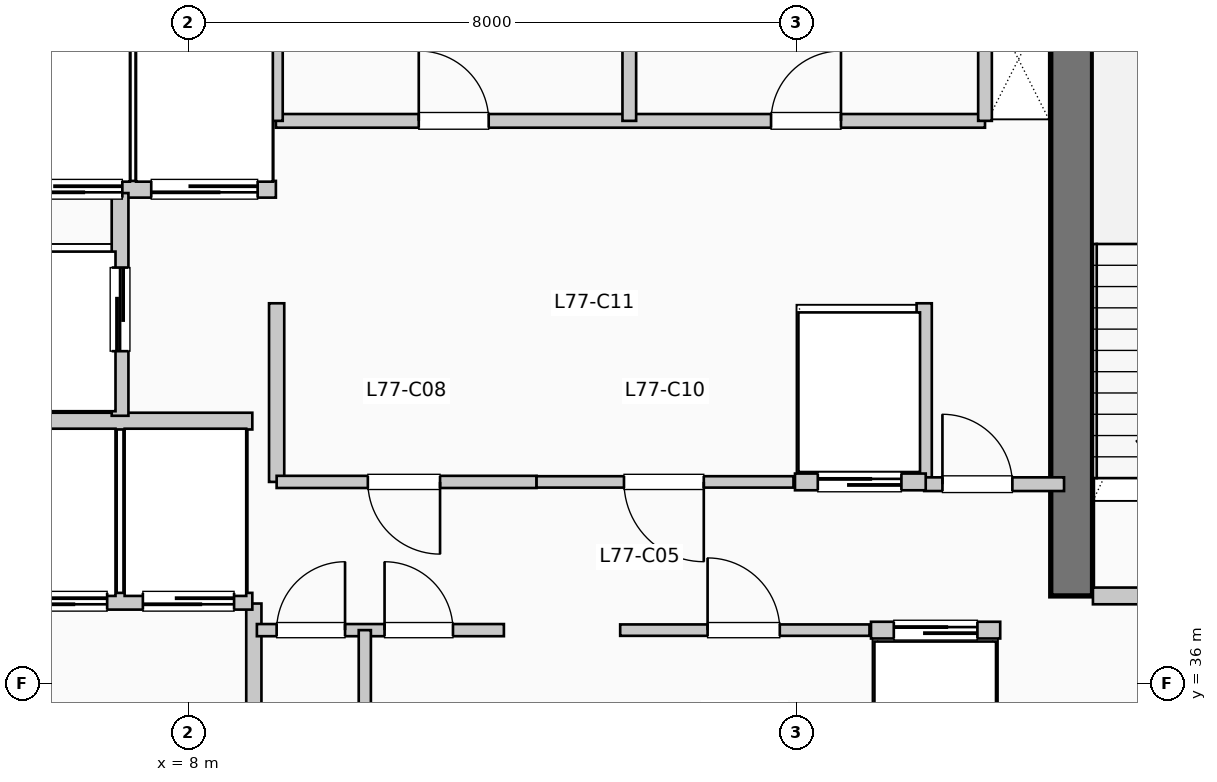
"""IFC4 building model, lengths in metres.
Left out: names, types, materials, properties, quantities, classifications, styles, units other than length and angle.
Written with IfcOpenShell. Run it as: python <this file> out.ifc"""

import sys

from ifc_helpers import new_model, si_unit, direction, frame, frame_2d, origin, place, context, subcontext, project, spatial, rectangle, extrude, element, fill, save


model = new_model("IFC4")
c1 = context("Model", 3, precision=1e-05, world=origin(), true_north=direction((0.0, 1.0)))
c2 = subcontext(c1, "Body", "Model", "MODEL_VIEW")
j1 = project(units=[si_unit("LENGTHUNIT", "METRE"), si_unit("PLANEANGLEUNIT", "RADIAN")], contexts=[c1])
p1 = place(None, origin())
s1 = spatial("IfcSite", under=j1, at=p1, CompositionType="ELEMENT")
p2 = place(p1, origin())
s2 = spatial("IfcBuilding", under=s1, at=p2, CompositionType="ELEMENT")
p3 = place(p2, frame((0.0, 0.0, 315.81)))
s3 = spatial("IfcBuildingStorey", under=s2, at=p3, CompositionType="ELEMENT", Elevation=315.81)
p4 = place(p3, frame((19.62, 37.15, 0.0), z_axis=(0.0, 0.0, 1.0), x_axis=(0.0, 1.0, 0.0)))
e1 = element("IfcWall", 1, at=p4, inside=s3, PredefinedType="SHEAR", context=c2, shape_type="SweptSolid", body=[
    extrude(rectangle(XDim=7.89, YDim=0.55, at=frame_2d((3.945, 0.0))), origin(), (0.0, 0.0, 1.0), 3.96),
])
p5 = place(p3, frame((8.86, 34.55, 0.0), z_axis=(0.0, 0.0, 1.0), x_axis=(0.0, 1.0, 0.0)))
e2 = element("IfcWall", 2, at=p5, inside=s3, PredefinedType="PARTITIONING", context=c2, shape_type="SweptSolid", body=[
    extrude(rectangle(XDim=2.5, YDim=0.2, at=frame_2d((1.25, 0.0))), origin(), (0.0, 0.0, 1.0), 3.74),
])
p6 = place(p3, frame((19.9, 37.15, 0.0), z_axis=(0.0, 0.0, 1.0), x_axis=(1.0, 0.0, 0.0)))
e3 = element("IfcWall", 3, at=p6, inside=s3, PredefinedType="PARTITIONING", context=c2, shape_type="SweptSolid", body=[
    extrude(rectangle(XDim=3.15, YDim=0.22, at=frame_2d((1.575, 0.0))), origin(), (0.0, 0.0, 1.0), 3.74),
])
p7 = place(p6, frame((2.05, 0.0, 0.0), z_axis=(0.0, 0.0, 1.0), x_axis=(-1.0, 0.0, 0.0)))
e4 = element("IfcOpeningElement", 4, at=p7, cuts=e3, PredefinedType="OPENING", context=c2, shape_type="SweptSolid", body=[
    extrude(rectangle(XDim=1.05, YDim=2.15, at=frame_2d((0.525, 1.075))), frame((0.0, 0.12, 0.0), z_axis=(0.0, -1.0, 0.0), x_axis=(1.0, 0.0, 0.0)), (0.0, 0.0, 1.0), 0.24),
])
p8 = place(p3, frame((5.38, 37.08, 0.0), z_axis=(0.0, 0.0, 1.0), x_axis=(1.0, 0.0, 0.0)))
e5 = element("IfcWall", 5, at=p8, inside=s3, PredefinedType="PARTITIONING", context=c2, shape_type="SweptSolid", body=[
    extrude(rectangle(XDim=3.46, YDim=0.22, at=frame_2d((1.73, 0.0))), origin(), (0.0, 0.0, 1.0), 3.74),
])
p9 = place(p8, frame((1.55, 0.0, 0.0), z_axis=(0.0, 0.0, 1.0), x_axis=(-1.0, 0.0, 0.0)))
e6 = element("IfcOpeningElement", 6, at=p9, cuts=e5, PredefinedType="OPENING", context=c2, shape_type="SweptSolid", body=[
    extrude(rectangle(XDim=1.2, YDim=2.2, at=frame_2d((0.6, 1.1))), frame((0.0, 0.12, 0.0), z_axis=(0.0, -1.0, 0.0), x_axis=(1.0, 0.0, 0.0)), (0.0, 0.0, 1.0), 0.24),
])
p10 = place(p8, frame((3.22, 0.0, 0.0), z_axis=(0.0, 0.0, 1.0), x_axis=(-1.0, 0.0, 0.0)))
e7 = element("IfcOpeningElement", 7, at=p10, cuts=e5, PredefinedType="OPENING", context=c2, shape_type="SweptSolid", body=[
    extrude(rectangle(XDim=1.2, YDim=2.2, at=frame_2d((0.6, 1.1))), frame((0.0, 0.12, 0.0), z_axis=(0.0, -1.0, 0.0), x_axis=(1.0, 0.0, 0.0)), (0.0, 0.0, 1.0), 0.24),
])
p11 = place(p3, frame((5.38, 39.45, 0.0), z_axis=(0.0, 0.0, 1.0), x_axis=(1.0, 0.0, 0.0)))
e8 = element("IfcWall", 8, at=p11, inside=s3, PredefinedType="PARTITIONING", context=c2, shape_type="SweptSolid", body=[
    extrude(rectangle(XDim=3.46, YDim=0.22, at=frame_2d((1.73, 0.0))), origin(), (0.0, 0.0, 1.0), 3.74),
])
p12 = place(p3, frame((5.38, 42.5, 0.0), z_axis=(0.0, 0.0, 1.0), x_axis=(1.0, 0.0, 0.0)))
e9 = element("IfcWall", 9, at=p12, inside=s3, PredefinedType="PARTITIONING", context=c2, shape_type="SweptSolid", body=[
    extrude(rectangle(XDim=3.77, YDim=0.22, at=frame_2d((1.885, 0.0))), origin(), (0.0, 0.0, 1.0), 3.74),
])
p13 = place(p12, frame((1.75, 0.0, 0.0), z_axis=(0.0, 0.0, 1.0), x_axis=(-1.0, 0.0, 0.0)))
e10 = element("IfcOpeningElement", 10, at=p13, cuts=e9, PredefinedType="OPENING", context=c2, shape_type="SweptSolid", body=[
    extrude(rectangle(XDim=1.4, YDim=2.2, at=frame_2d((0.7, 1.1))), frame((0.0, 0.12, 0.0), z_axis=(0.0, -1.0, 0.0), x_axis=(1.0, 0.0, 0.0)), (0.0, 0.0, 1.0), 0.24),
])
p14 = place(p12, frame((3.53, 0.0, 0.0), z_axis=(0.0, 0.0, 1.0), x_axis=(-1.0, 0.0, 0.0)))
e11 = element("IfcOpeningElement", 11, at=p14, cuts=e9, PredefinedType="OPENING", context=c2, shape_type="SweptSolid", body=[
    extrude(rectangle(XDim=1.4, YDim=2.2, at=frame_2d((0.7, 1.1))), frame((0.0, 0.12, 0.0), z_axis=(0.0, -1.0, 0.0), x_axis=(1.0, 0.0, 0.0)), (0.0, 0.0, 1.0), 0.24),
])
p15 = place(p3, frame((7.1, 39.52, 0.0), z_axis=(0.0, 0.0, 1.0), x_axis=(0.0, 1.0, 0.0)))
e12 = element("IfcWall", 12, at=p15, inside=s3, PredefinedType="PARTITIONING", context=c2, shape_type="SweptSolid", body=[
    extrude(rectangle(XDim=2.93, YDim=0.22, at=frame_2d((1.465, 0.0))), origin(), (0.0, 0.0, 1.0), 3.74),
])
p16 = place(p15, frame((0.85, 0.0, 0.0)))
e13 = element("IfcOpeningElement", 13, at=p16, cuts=e12, PredefinedType="OPENING", context=c2, shape_type="SweptSolid", body=[
    extrude(rectangle(XDim=1.1, YDim=2.2, at=frame_2d((0.55, 1.1))), frame((0.0, 0.12, 0.0), z_axis=(0.0, -1.0, 0.0), x_axis=(1.0, 0.0, 0.0)), (0.0, 0.0, 1.0), 0.24),
])
for number, where, z_axis, x_axis in (
    (14, (9.16, 38.65, 0.0), (0.0, 0.0, 1.0), (0.0, 1.0, 0.0)),
    (15, (17.68, 38.65, 0.0), (0.0, 0.0, 1.0), (0.0, 1.0, 0.0)),
):
    element("IfcWall", number, at=place(p3, frame(where, z_axis=z_axis, x_axis=x_axis)), inside=s3, PredefinedType="PARTITIONING", context=c2, shape_type="SweptSolid", body=[
        extrude(rectangle(XDim=2.35, YDim=0.2, at=frame_2d((1.175, 0.0))), origin(), (0.0, 0.0, 1.0), 3.74),
    ])
p17 = place(p3, frame((17.68, 38.62, 0.0), z_axis=(0.0, 0.0, 1.0), x_axis=(1.0, 0.0, 0.0)))
e16 = element("IfcWall", 16, at=p17, inside=s3, PredefinedType="PARTITIONING", context=c2, shape_type="SweptSolid", body=[
    extrude(rectangle(XDim=1.84, YDim=0.18, at=frame_2d((0.92, 0.0))), origin(), (0.0, 0.0, 1.0), 3.74),
])
p18 = place(p17, frame((0.24, 0.0, 0.0)))
e17 = element("IfcOpeningElement", 17, at=p18, cuts=e16, PredefinedType="OPENING", context=c2, shape_type="SweptSolid", body=[
    extrude(rectangle(XDim=0.92, YDim=2.1, at=frame_2d((0.46, 1.05))), frame((0.0, 0.1, 0.0), z_axis=(0.0, -1.0, 0.0), x_axis=(1.0, 0.0, 0.0)), (0.0, 0.0, 1.0), 0.2),
])
p19 = place(p3, frame((8.9, 36.7, 0.0), z_axis=(0.0, 0.0, 1.0), x_axis=(1.0, 0.0, 0.0)))
e18 = element("IfcWall", 18, at=p19, inside=s3, PredefinedType="PARTITIONING", context=c2, shape_type="SweptSolid", body=[
    extrude(rectangle(XDim=3.25, YDim=0.16, at=frame_2d((1.625, 0.0))), origin(), (0.0, 0.0, 1.0), 3.74),
])
p20 = place(p19, frame((0.26, 0.0, 0.0)))
e19 = element("IfcOpeningElement", 19, at=p20, cuts=e18, PredefinedType="OPENING", context=c2, shape_type="SweptSolid", body=[
    extrude(rectangle(XDim=0.9, YDim=2.15, at=frame_2d((0.45, 1.075))), frame((0.0, 0.09, 0.0), z_axis=(0.0, -1.0, 0.0), x_axis=(1.0, 0.0, 0.0)), (0.0, 0.0, 1.0), 0.18),
])
p21 = place(p19, frame((1.68, 0.0, 0.0)))
e20 = element("IfcOpeningElement", 20, at=p21, cuts=e18, PredefinedType="OPENING", context=c2, shape_type="SweptSolid", body=[
    extrude(rectangle(XDim=0.9, YDim=2.15, at=frame_2d((0.45, 1.075))), frame((0.0, 0.09, 0.0), z_axis=(0.0, -1.0, 0.0), x_axis=(1.0, 0.0, 0.0)), (0.0, 0.0, 1.0), 0.18),
])
p22 = place(p3, frame((10.32, 34.55, 0.0), z_axis=(0.0, 0.0, 1.0), x_axis=(0.0, 1.0, 0.0)))
e21 = element("IfcWall", 21, at=p22, inside=s3, PredefinedType="PARTITIONING", context=c2, shape_type="SweptSolid", body=[
    extrude(rectangle(XDim=2.15, YDim=0.16, at=frame_2d((1.075, 0.0))), origin(), (0.0, 0.0, 1.0), 3.74),
])
p23 = place(p3, frame((9.16, 38.65, 0.0), z_axis=(0.0, 0.0, 1.0), x_axis=(1.0, 0.0, 0.0)))
e22 = element("IfcWall", 22, at=p23, inside=s3, PredefinedType="PARTITIONING", context=c2, shape_type="SweptSolid", body=[
    extrude(rectangle(XDim=3.42, YDim=0.16, at=frame_2d((1.71, 0.0))), origin(), (0.0, 0.0, 1.0), 3.74),
])
p24 = place(p23, frame((2.15, 0.0, 0.0), z_axis=(0.0, 0.0, 1.0), x_axis=(-1.0, 0.0, 0.0)))
e23 = element("IfcOpeningElement", 23, at=p24, cuts=e22, PredefinedType="OPENING", context=c2, shape_type="SweptSolid", body=[
    extrude(rectangle(XDim=0.95, YDim=2.15, at=frame_2d((0.475, 1.075))), frame((0.0, 0.09, 0.0), z_axis=(0.0, -1.0, 0.0), x_axis=(1.0, 0.0, 0.0)), (0.0, 0.0, 1.0), 0.18),
])
p25 = place(p3, frame((13.68, 36.7, 0.0), z_axis=(0.0, 0.0, 1.0), x_axis=(1.0, 0.0, 0.0)))
e24 = element("IfcWall", 24, at=p25, inside=s3, PredefinedType="PARTITIONING", context=c2, shape_type="SweptSolid", body=[
    extrude(rectangle(XDim=3.28, YDim=0.15, at=frame_2d((1.64, 0.0))), origin(), (0.0, 0.0, 1.0), 3.74),
])
p26 = place(p25, frame((1.15, 0.0, 0.0)))
e25 = element("IfcOpeningElement", 25, at=p26, cuts=e24, PredefinedType="OPENING", context=c2, shape_type="SweptSolid", body=[
    extrude(rectangle(XDim=0.95, YDim=2.15, at=frame_2d((0.475, 1.075))), frame((0.0, 0.085, 0.0), z_axis=(0.0, -1.0, 0.0), x_axis=(1.0, 0.0, 0.0)), (0.0, 0.0, 1.0), 0.17),
])
p27 = place(p3, frame((12.58, 38.65, 0.0), z_axis=(0.0, 0.0, 1.0), x_axis=(1.0, 0.0, 0.0)))
e26 = element("IfcWall", 26, at=p27, inside=s3, PredefinedType="PARTITIONING", context=c2, shape_type="SweptSolid", body=[
    extrude(rectangle(XDim=3.38, YDim=0.15, at=frame_2d((1.69, 0.0))), origin(), (0.0, 0.0, 1.0), 3.74),
])
p28 = place(p27, frame((2.2, 0.0, 0.0), z_axis=(0.0, 0.0, 1.0), x_axis=(-1.0, 0.0, 0.0)))
e27 = element("IfcOpeningElement", 27, at=p28, cuts=e26, PredefinedType="OPENING", context=c2, shape_type="SweptSolid", body=[
    extrude(rectangle(XDim=1.05, YDim=2.15, at=frame_2d((0.525, 1.075))), frame((0.0, 0.085, 0.0), z_axis=(0.0, -1.0, 0.0), x_axis=(1.0, 0.0, 0.0)), (0.0, 0.0, 1.0), 0.17),
])
p29 = place(p3, frame((16.98, 36.7, 0.0), z_axis=(0.0, 0.0, 1.0), x_axis=(1.0, 0.0, 0.0)))
e28 = element("IfcWall", 28, at=p29, inside=s3, PredefinedType="PARTITIONING", context=c2, shape_type="SweptSolid", body=[
    extrude(rectangle(XDim=1.7, YDim=0.22, at=frame_2d((0.85, 0.0))), origin(), (0.0, 0.0, 1.0), 3.74),
])
p30 = place(p29, frame((0.3, 0.0, 0.0)))
e29 = element("IfcOpeningElement", 29, at=p30, cuts=e28, PredefinedType="OPENING", context=c2, shape_type="SweptSolid", body=[
    extrude(rectangle(XDim=1.1, YDim=2.2, at=frame_2d((0.55, 1.1))), frame((0.0, 0.12, 0.0), z_axis=(0.0, -1.0, 0.0), x_axis=(1.0, 0.0, 0.0)), (0.0, 0.0, 1.0), 0.24),
])
p31 = place(p3, frame((15.98, 38.65, 0.0), z_axis=(0.0, 0.0, 1.0), x_axis=(1.0, 0.0, 0.0)))
e30 = element("IfcWall", 30, at=p31, inside=s3, PredefinedType="PARTITIONING", context=c2, shape_type="SweptSolid", body=[
    extrude(rectangle(XDim=1.72, YDim=0.22, at=frame_2d((0.86, 0.0))), origin(), (0.0, 0.0, 1.0), 3.74),
])
p32 = place(p31, frame((0.3, 0.0, 0.0)))
e31 = element("IfcOpeningElement", 31, at=p32, cuts=e30, PredefinedType="OPENING", context=c2, shape_type="SweptSolid", body=[
    extrude(rectangle(XDim=1.1, YDim=2.2, at=frame_2d((0.55, 1.1))), frame((0.0, 0.12, 0.0), z_axis=(0.0, -1.0, 0.0), x_axis=(1.0, 0.0, 0.0)), (0.0, 0.0, 1.0), 0.24),
])
p33 = place(p3, frame((9.15, 43.4, 0.0), z_axis=(0.0, 0.0, 1.0), x_axis=(1.0, 0.0, 0.0)))
e32 = element("IfcWall", 32, at=p33, inside=s3, PredefinedType="PLUMBINGWALL", context=c2, shape_type="SweptSolid", body=[
    extrude(rectangle(XDim=9.33, YDim=0.18, at=frame_2d((4.665, 0.0))), origin(), (0.0, 0.0, 1.0), 3.74),
])
p34 = place(p33, frame((1.88, 0.0, 0.0)))
e33 = element("IfcOpeningElement", 33, at=p34, cuts=e32, PredefinedType="OPENING", context=c2, shape_type="SweptSolid", body=[
    extrude(rectangle(XDim=0.92, YDim=2.1, at=frame_2d((0.46, 1.05))), frame((0.0, 0.1, 0.0), z_axis=(0.0, -1.0, 0.0), x_axis=(1.0, 0.0, 0.0)), (0.0, 0.0, 1.0), 0.2),
])
p35 = place(p33, frame((6.515, 0.0, 0.0)))
e34 = element("IfcOpeningElement", 34, at=p35, cuts=e32, PredefinedType="OPENING", context=c2, shape_type="SweptSolid", body=[
    extrude(rectangle(XDim=0.92, YDim=2.1, at=frame_2d((0.46, 1.05))), frame((0.0, 0.1, 0.0), z_axis=(0.0, -1.0, 0.0), x_axis=(1.0, 0.0, 0.0)), (0.0, 0.0, 1.0), 0.2),
])
for number, where, z_axis, x_axis in (
    (35, (9.15, 43.4, 0.0), (0.0, 0.0, 1.0), (0.0, 1.0, 0.0)),
    (36, (18.48, 43.4, 0.0), (0.0, 0.0, 1.0), (0.0, 1.0, 0.0)),
    (37, (13.8, 43.4, 0.0), (0.0, 0.0, 1.0), (0.0, 1.0, 0.0)),
):
    element("IfcWall", number, at=place(p3, frame(where, z_axis=z_axis, x_axis=x_axis)), inside=s3, PredefinedType="PLUMBINGWALL", context=c2, shape_type="SweptSolid", body=[
        extrude(rectangle(XDim=1.88, YDim=0.18, at=frame_2d((0.94, 0.0))), origin(), (0.0, 0.0, 1.0), 3.74),
    ])
p36 = place(p9, origin())
e38 = element("IfcDoor", 38, at=p36, inside=s3, OperationType="SLIDING_TO_RIGHT", PredefinedType="DOOR", context=c2, shape_type="SweptSolid", body=[
    extrude(rectangle(XDim=1.2, YDim=2.2, at=frame_2d((0.6, 1.1))), frame((0.0, 0.025, 0.0), z_axis=(0.0, -1.0, 0.0), x_axis=(1.0, 0.0, 0.0)), (0.0, 0.0, 1.0), 0.05),
])
fill(e6, e38)
p37 = place(p10, origin())
e39 = element("IfcDoor", 39, at=p37, inside=s3, OperationType="SLIDING_TO_RIGHT", PredefinedType="DOOR", context=c2, shape_type="SweptSolid", body=[
    extrude(rectangle(XDim=1.2, YDim=2.2, at=frame_2d((0.6, 1.1))), frame((0.0, 0.025, 0.0), z_axis=(0.0, -1.0, 0.0), x_axis=(1.0, 0.0, 0.0)), (0.0, 0.0, 1.0), 0.05),
])
fill(e7, e39)
p38 = place(p13, origin())
e40 = element("IfcDoor", 40, at=p38, inside=s3, OperationType="SLIDING_TO_LEFT", PredefinedType="DOOR", context=c2, shape_type="SweptSolid", body=[
    extrude(rectangle(XDim=1.4, YDim=2.2, at=frame_2d((0.7, 1.1))), frame((0.0, 0.025, 0.0), z_axis=(0.0, -1.0, 0.0), x_axis=(1.0, 0.0, 0.0)), (0.0, 0.0, 1.0), 0.05),
])
fill(e10, e40)
p39 = place(p14, origin())
e41 = element("IfcDoor", 41, at=p39, inside=s3, OperationType="SLIDING_TO_LEFT", PredefinedType="DOOR", context=c2, shape_type="SweptSolid", body=[
    extrude(rectangle(XDim=1.4, YDim=2.2, at=frame_2d((0.7, 1.1))), frame((0.0, 0.025, 0.0), z_axis=(0.0, -1.0, 0.0), x_axis=(1.0, 0.0, 0.0)), (0.0, 0.0, 1.0), 0.05),
])
fill(e11, e41)
p40 = place(p16, origin())
e42 = element("IfcDoor", 42, at=p40, inside=s3, OperationType="SLIDING_TO_LEFT", PredefinedType="DOOR", context=c2, shape_type="SweptSolid", body=[
    extrude(rectangle(XDim=1.1, YDim=2.2, at=frame_2d((0.55, 1.1))), frame((0.0, 0.025, 0.0), z_axis=(0.0, -1.0, 0.0), x_axis=(1.0, 0.0, 0.0)), (0.0, 0.0, 1.0), 0.05),
])
fill(e13, e42)
p41 = place(p18, origin())
e43 = element("IfcDoor", 43, at=p41, inside=s3, OperationType="SINGLE_SWING_LEFT", PredefinedType="DOOR", context=c2, shape_type="SweptSolid", body=[
    extrude(rectangle(XDim=0.92, YDim=2.1, at=frame_2d((0.46, 1.05))), frame((0.0, 0.025, 0.0), z_axis=(0.0, -1.0, 0.0), x_axis=(1.0, 0.0, 0.0)), (0.0, 0.0, 1.0), 0.05),
])
fill(e17, e43)
p42 = place(p20, origin())
e44 = element("IfcDoor", 44, at=p42, inside=s3, OperationType="SINGLE_SWING_RIGHT", PredefinedType="DOOR", context=c2, shape_type="SweptSolid", body=[
    extrude(rectangle(XDim=0.9, YDim=2.15, at=frame_2d((0.45, 1.075))), frame((0.0, 0.025, 0.0), z_axis=(0.0, -1.0, 0.0), x_axis=(1.0, 0.0, 0.0)), (0.0, 0.0, 1.0), 0.05),
])
fill(e19, e44)
p43 = place(p21, origin())
e45 = element("IfcDoor", 45, at=p43, inside=s3, OperationType="SINGLE_SWING_LEFT", PredefinedType="DOOR", context=c2, shape_type="SweptSolid", body=[
    extrude(rectangle(XDim=0.9, YDim=2.15, at=frame_2d((0.45, 1.075))), frame((0.0, 0.025, 0.0), z_axis=(0.0, -1.0, 0.0), x_axis=(1.0, 0.0, 0.0)), (0.0, 0.0, 1.0), 0.05),
])
fill(e20, e45)
p44 = place(p24, origin())
e46 = element("IfcDoor", 46, at=p44, inside=s3, OperationType="SINGLE_SWING_RIGHT", PredefinedType="DOOR", context=c2, shape_type="SweptSolid", body=[
    extrude(rectangle(XDim=0.95, YDim=2.15, at=frame_2d((0.475, 1.075))), frame((0.0, 0.025, 0.0), z_axis=(0.0, -1.0, 0.0), x_axis=(1.0, 0.0, 0.0)), (0.0, 0.0, 1.0), 0.05),
])
fill(e23, e46)
p45 = place(p26, origin())
e47 = element("IfcDoor", 47, at=p45, inside=s3, OperationType="SINGLE_SWING_LEFT", PredefinedType="DOOR", context=c2, shape_type="SweptSolid", body=[
    extrude(rectangle(XDim=0.95, YDim=2.15, at=frame_2d((0.475, 1.075))), frame((0.0, 0.025, 0.0), z_axis=(0.0, -1.0, 0.0), x_axis=(1.0, 0.0, 0.0)), (0.0, 0.0, 1.0), 0.05),
])
fill(e25, e47)
p46 = place(p28, origin())
e48 = element("IfcDoor", 48, at=p46, inside=s3, OperationType="SINGLE_SWING_RIGHT", PredefinedType="DOOR", context=c2, shape_type="SweptSolid", body=[
    extrude(rectangle(XDim=1.05, YDim=2.15, at=frame_2d((0.525, 1.075))), frame((0.0, 0.025, 0.0), z_axis=(0.0, -1.0, 0.0), x_axis=(1.0, 0.0, 0.0)), (0.0, 0.0, 1.0), 0.05),
])
fill(e27, e48)
p47 = place(p30, origin())
e49 = element("IfcDoor", 49, at=p47, inside=s3, OperationType="SLIDING_TO_LEFT", PredefinedType="DOOR", context=c2, shape_type="SweptSolid", body=[
    extrude(rectangle(XDim=1.1, YDim=2.2, at=frame_2d((0.55, 1.1))), frame((0.0, 0.025, 0.0), z_axis=(0.0, -1.0, 0.0), x_axis=(1.0, 0.0, 0.0)), (0.0, 0.0, 1.0), 0.05),
])
fill(e29, e49)
p48 = place(p32, origin())
e50 = element("IfcDoor", 50, at=p48, inside=s3, OperationType="SLIDING_TO_LEFT", PredefinedType="DOOR", context=c2, shape_type="SweptSolid", body=[
    extrude(rectangle(XDim=1.1, YDim=2.2, at=frame_2d((0.55, 1.1))), frame((0.0, 0.025, 0.0), z_axis=(0.0, -1.0, 0.0), x_axis=(1.0, 0.0, 0.0)), (0.0, 0.0, 1.0), 0.05),
])
fill(e31, e50)
p49 = place(p34, origin())
e51 = element("IfcDoor", 51, at=p49, inside=s3, OperationType="SINGLE_SWING_LEFT", PredefinedType="DOOR", context=c2, shape_type="SweptSolid", body=[
    extrude(rectangle(XDim=0.92, YDim=2.1, at=frame_2d((0.46, 1.05))), frame((0.0, 0.025, 0.0), z_axis=(0.0, -1.0, 0.0), x_axis=(1.0, 0.0, 0.0)), (0.0, 0.0, 1.0), 0.05),
])
fill(e33, e51)
p50 = place(p35, origin())
e52 = element("IfcDoor", 52, at=p50, inside=s3, OperationType="SINGLE_SWING_RIGHT", PredefinedType="DOOR", context=c2, shape_type="SweptSolid", body=[
    extrude(rectangle(XDim=0.92, YDim=2.1, at=frame_2d((0.46, 1.05))), frame((0.0, 0.025, 0.0), z_axis=(0.0, -1.0, 0.0), x_axis=(1.0, 0.0, 0.0)), (0.0, 0.0, 1.0), 0.05),
])
fill(e34, e52)
save(model, sys.argv[1])
